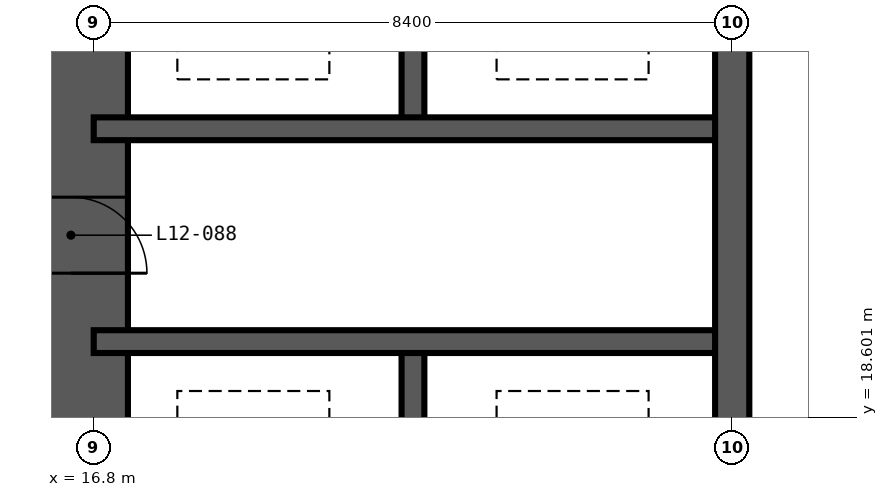
"""IFC4 building model, lengths in metres.
Left out: names, types, materials, properties, quantities, classifications, styles, units other than length and angle.
Written with IfcOpenShell. Run it as: python <this file> out.ifc"""

import sys

from ifc_helpers import new_model, si_unit, direction, frame, frame_2d, origin, place, context, subcontext, project, spatial, rectangle, extrude, element, fill, save


model = new_model("IFC4")
c1 = context("Model", 3, precision=1e-05, world=origin(), true_north=direction((0.0, 1.0)))
c2 = subcontext(c1, "Body", "Model", "MODEL_VIEW")
j1 = project(units=[si_unit("LENGTHUNIT", "METRE"), si_unit("PLANEANGLEUNIT", "RADIAN")], contexts=[c1])
p1 = place(None, origin())
s1 = spatial("IfcSite", under=j1, at=p1, CompositionType="ELEMENT")
p2 = place(p1, origin())
s2 = spatial("IfcBuilding", under=s1, at=p2, CompositionType="ELEMENT")
p3 = place(p2, frame((0.0, 0.0, 52.2)))
s3 = spatial("IfcBuildingStorey", under=s2, at=p3, CompositionType="ELEMENT", Elevation=52.2)
p4 = place(p3, frame((16.5, 41.55, -0.35), z_axis=(0.0, 0.0, 1.0), x_axis=(0.0, -1.0, 0.0)))
e1 = element("IfcWall", 1, at=p4, inside=s3, PredefinedType="SHEAR", context=c2, shape_type="SweptSolid", body=[
    extrude(rectangle(XDim=24.3, YDim=1.5, at=frame_2d((12.15, 0.0))), origin(), (0.0, 0.0, 1.0), 3.6),
])
p5 = place(p4, frame((11.25, 0.0, 0.35)))
e2 = element("IfcOpeningElement", 2, at=p5, cuts=e1, PredefinedType="OPENING", context=c2, shape_type="SweptSolid", body=[
    extrude(rectangle(XDim=1.8, YDim=2.2, at=frame_2d((0.9, 1.1))), frame((0.0, 0.76, 0.0), z_axis=(0.0, -1.0, 0.0), x_axis=(1.0, 0.0, 0.0)), (0.0, 0.0, 1.0), 1.52),
])
p6 = place(p4, frame((20.05, 0.0, 0.35)))
e3 = element("IfcOpeningElement", 3, at=p6, cuts=e1, PredefinedType="OPENING", context=c2, shape_type="SweptSolid", body=[
    extrude(rectangle(XDim=1.0, YDim=2.1, at=frame_2d((0.5, 1.05))), frame((0.0, 0.76, 0.0), z_axis=(0.0, -1.0, 0.0), x_axis=(1.0, 0.0, 0.0)), (0.0, 0.0, 1.0), 1.52),
])
p7 = place(p4, frame((5.35, 0.0, 0.35)))
e4 = element("IfcOpeningElement", 4, at=p7, cuts=e1, PredefinedType="OPENING", context=c2, shape_type="SweptSolid", body=[
    extrude(rectangle(XDim=1.0, YDim=2.1, at=frame_2d((0.5, 1.05))), frame((0.0, 0.76, 0.0), z_axis=(0.0, -1.0, 0.0), x_axis=(1.0, 0.0, 0.0)), (0.0, 0.0, 1.0), 1.52),
])
for number, where, z_axis, x_axis in (
    (5, (21.0, 16.8, -0.35), (0.0, 0.0, 1.0), (0.0, 1.0, 0.0)),
    (6, (21.0, 22.4, -0.35), (0.0, 0.0, 1.0), (0.0, 1.0, 0.0)),
):
    element("IfcWall", number, at=place(p3, frame(where, z_axis=z_axis, x_axis=x_axis)), inside=s3, PredefinedType="SHEAR", context=c2, shape_type="SweptSolid", body=[
        extrude(rectangle(XDim=2.8, YDim=0.3, at=frame_2d((1.4, 0.0))), origin(), (0.0, 0.0, 1.0), 3.6),
    ])
for number, where, z_axis, x_axis in (
    (7, (16.8, 19.6, -0.35), (0.0, 0.0, 1.0), (1.0, 0.0, 0.0)),
    (8, (16.8, 22.4, -0.35), (0.0, 0.0, 1.0), (1.0, 0.0, 0.0)),
):
    element("IfcWall", number, at=place(p3, frame(where, z_axis=z_axis, x_axis=x_axis)), inside=s3, PredefinedType="SHEAR", context=c2, shape_type="SweptSolid", body=[
        extrude(rectangle(XDim=8.4, YDim=0.3, at=frame_2d((4.2, 0.0))), origin(), (0.0, 0.0, 1.0), 3.6),
    ])
p8 = place(p3, frame((25.2, 16.8, -0.35), z_axis=(0.0, 0.0, 1.0), x_axis=(0.0, 1.0, 0.0)))
e9 = element("IfcWall", 9, at=p8, inside=s3, PredefinedType="SHEAR", context=c2, shape_type="SweptSolid", body=[
    extrude(rectangle(XDim=25.2, YDim=0.45, at=frame_2d((12.6, 0.0))), origin(), (0.0, 0.0, 1.0), 3.6),
])
p9 = place(p6, origin())
e10 = element("IfcDoor", 10, at=p9, inside=s3, OperationType="SINGLE_SWING_RIGHT", PredefinedType="DOOR", context=c2, shape_type="SweptSolid", body=[
    extrude(rectangle(XDim=1.0, YDim=2.1, at=frame_2d((0.5, 1.05))), frame((0.0, 0.025, 0.0), z_axis=(0.0, -1.0, 0.0), x_axis=(1.0, 0.0, 0.0)), (0.0, 0.0, 1.0), 0.05),
])
fill(e3, e10)
save(model, sys.argv[1])
